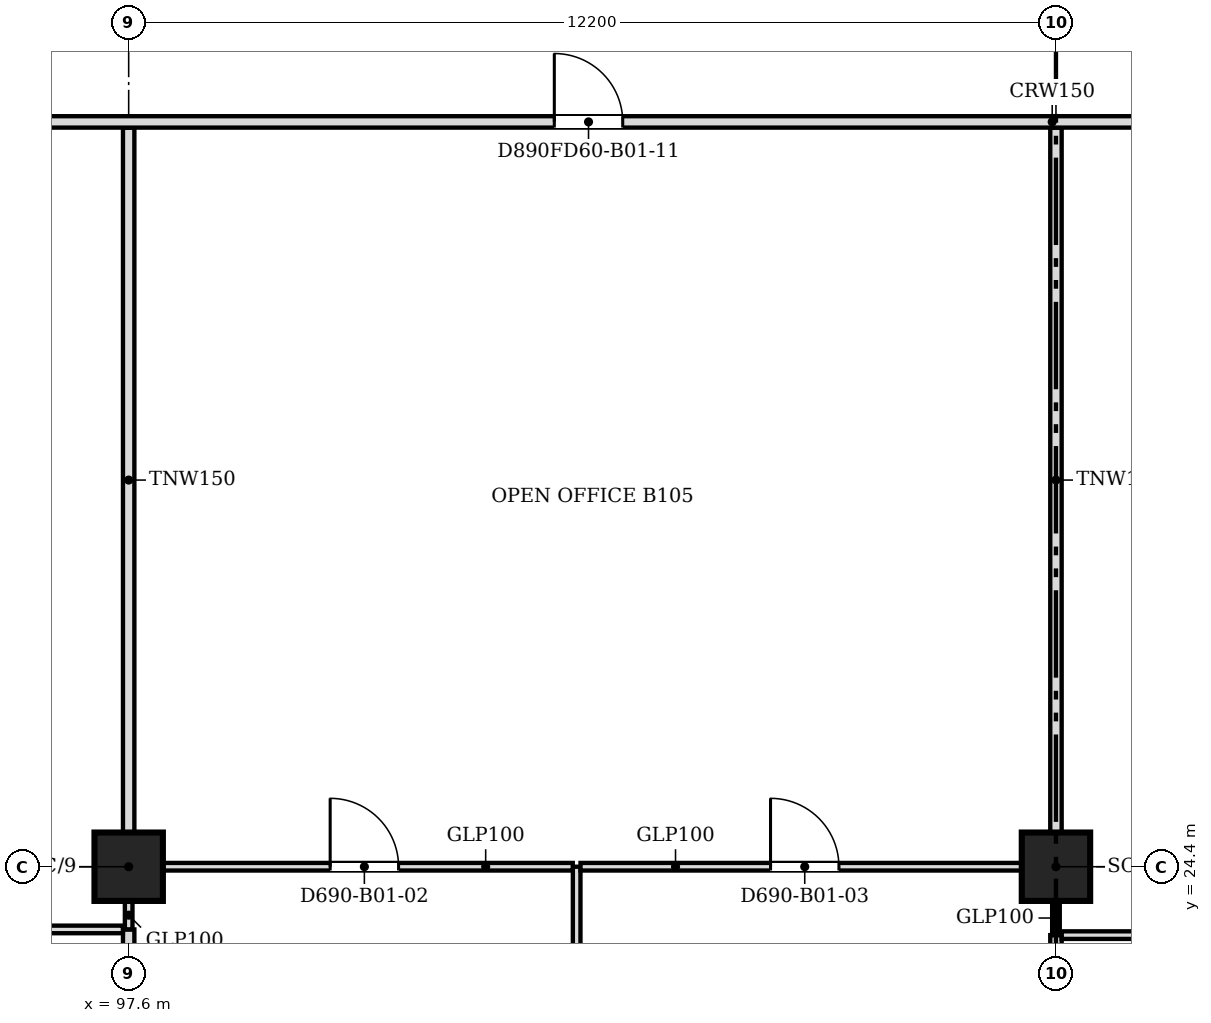
"""IFC4 building model, lengths in metres.
Left out: names, types, materials, properties, quantities, classifications, styles, units other than length and angle.
Written with IfcOpenShell. Run it as: python <this file> out.ifc"""

import sys

from ifc_helpers import new_model, si_unit, direction, frame, frame_2d, origin, origin_2d, place, context, subcontext, project, spatial, rectangle, extrude, source, transform, mapped, element, fill, save


model = new_model("IFC4")
c1 = context("Model", 3, precision=1e-05, world=origin(), true_north=direction((0.0, 1.0)))
c2 = subcontext(c1, "Body", "Model", "MODEL_VIEW")
j1 = project(units=[si_unit("LENGTHUNIT", "METRE"), si_unit("PLANEANGLEUNIT", "RADIAN")], contexts=[c1])
p1 = place(None, origin())
s1 = spatial("IfcSite", under=j1, at=p1, CompositionType="ELEMENT")
p2 = place(p1, origin())
s2 = spatial("IfcBuilding", under=s1, at=p2, CompositionType="ELEMENT")
p3 = place(p2, frame((0.0, 0.0, 16.8)))
s3 = spatial("IfcBuildingStorey", under=s2, at=p3, CompositionType="ELEMENT", Elevation=16.8)
for number, where, z_axis, x_axis in (
    (1, (97.6, 24.4, 0.0), (0.0, 0.0, 1.0), (1.0, 0.0, 0.0)),
    (2, (109.8, 24.4, 0.0), (0.0, 0.0, 1.0), (1.0, 0.0, 0.0)),
):
    element("IfcColumn", number, at=place(p3, frame(where, z_axis=z_axis, x_axis=x_axis)), inside=s3, PredefinedType="COLUMN", context=c2, shape_type="SweptSolid", body=[
        extrude(rectangle(XDim=0.9, YDim=0.9, at=origin_2d()), origin(), (0.0, 0.0, 1.0), 4.3),
    ])
p4 = place(p3, frame((97.6, 18.8, 0.0), z_axis=(0.0, 0.0, 1.0), x_axis=(0.0, 1.0, 0.0)))
e3 = element("IfcWall", 3, at=p4, inside=s3, PredefinedType="PARTITIONING", context=c2, shape_type="SweptSolid", body=[
    extrude(rectangle(XDim=4.775, YDim=0.15, at=frame_2d((2.387, 0.0))), origin(), (0.0, 0.0, 1.0), 3.415),
])
p5 = place(p3, frame((103.494, 18.8, 0.0), z_axis=(0.0, 0.0, 1.0), x_axis=(0.0, 1.0, 0.0)))
e4 = element("IfcWall", 4, at=p5, inside=s3, PredefinedType="PARTITIONING", context=c2, shape_type="SweptSolid", body=[
    extrude(rectangle(XDim=5.6, YDim=0.1, at=frame_2d((2.8, 0.0))), origin(), (0.0, 0.0, 1.0), 3.415),
])
p6 = place(p3, frame((109.8, 18.8, 0.0), z_axis=(0.0, 0.0, 1.0), x_axis=(0.0, 1.0, 0.0)))
e5 = element("IfcWall", 5, at=p6, inside=s3, PredefinedType="PARTITIONING", context=c2, shape_type="SweptSolid", body=[
    extrude(rectangle(XDim=4.7, YDim=0.15, at=frame_2d((2.35, 0.0))), origin(), (0.0, 0.0, 1.0), 3.415),
])
p7 = place(p3, frame((109.8, 23.501, 0.0), z_axis=(0.0, 0.0, 1.0), x_axis=(0.0, 1.0, 0.0)))
e6 = element("IfcWall", 6, at=p7, inside=s3, PredefinedType="PARTITIONING", context=c2, shape_type="SweptSolid", body=[
    extrude(rectangle(XDim=0.448, YDim=0.1, at=frame_2d((0.224, 0.0))), origin(), (0.0, 0.0, 1.0), 3.415),
])
p8 = place(p3, frame((121.924, 23.5, 0.0), z_axis=(0.0, 0.0, 1.0), x_axis=(-1.0, 0.0, 0.0)))
e7 = element("IfcWall", 7, at=p8, inside=s3, PredefinedType="PARTITIONING", context=c2, shape_type="SweptSolid", body=[
    extrude(rectangle(XDim=12.048, YDim=0.1, at=frame_2d((6.024, 0.0))), origin(), (0.0, 0.0, 1.0), 3.415),
])
m1 = source(origin(), c2, "Body", "SweptSolid", [
    extrude(rectangle(XDim=0.9, YDim=2.1, at=frame_2d((0.45, 1.05))), frame((0.0, 0.06, 0.0), z_axis=(0.0, -1.0, 0.0), x_axis=(1.0, 0.0, 0.0)), (0.0, 0.0, 1.0), 0.12),
])
p9 = place(p8, frame((8.648, 0.0, 0.0)))
e8 = element("IfcOpeningElement", 8, at=p9, cuts=e7, PredefinedType="OPENING", context=c2, shape_type="MappedRepresentation", body=[
    mapped(m1, transform((0.0, 0.0, 0.0), scale=1.0)),
])
p10 = place(p8, frame((2.63, 0.0, 0.0)))
e9 = element("IfcOpeningElement", 9, at=p10, cuts=e7, PredefinedType="OPENING", context=c2, shape_type="MappedRepresentation", body=[
    mapped(m1, transform((0.0, 0.0, 0.0), scale=1.0)),
])
p11 = place(p3, frame((97.524, 23.575, 0.0), z_axis=(0.0, 0.0, 1.0), x_axis=(-1.0, 0.0, 0.0)))
e10 = element("IfcWall", 10, at=p11, inside=s3, PredefinedType="PARTITIONING", context=c2, shape_type="SweptSolid", body=[
    extrude(rectangle(XDim=11.27, YDim=0.1, at=frame_2d((5.635, 0.0))), origin(), (0.0, 0.0, 1.0), 3.415),
])
p12 = place(p11, frame((8.17, 0.0, 0.0)))
e11 = element("IfcOpeningElement", 11, at=p12, cuts=e10, PredefinedType="OPENING", context=c2, shape_type="MappedRepresentation", body=[
    mapped(m1, transform((0.0, 0.0, 0.0), scale=1.0)),
])
p13 = place(p11, frame((2.572, 0.0, 0.0)))
e12 = element("IfcOpeningElement", 12, at=p13, cuts=e10, PredefinedType="OPENING", context=c2, shape_type="MappedRepresentation", body=[
    mapped(m1, transform((0.0, 0.0, 0.0), scale=1.0)),
])
p14 = place(p3, frame((97.6, 23.576, 0.0), z_axis=(0.0, 0.0, 1.0), x_axis=(0.0, 1.0, 0.0)))
e13 = element("IfcWall", 13, at=p14, inside=s3, PredefinedType="PARTITIONING", context=c2, shape_type="SweptSolid", body=[
    extrude(rectangle(XDim=0.373, YDim=0.1, at=frame_2d((0.187, 0.0))), origin(), (0.0, 0.0, 1.0), 3.415),
])
p15 = place(p3, frame((103.443, 24.4, 0.0), z_axis=(0.0, 0.0, 1.0), x_axis=(-1.0, 0.0, 0.0)))
e14 = element("IfcWall", 14, at=p15, inside=s3, PredefinedType="PARTITIONING", context=c2, shape_type="SweptSolid", body=[
    extrude(rectangle(XDim=5.392, YDim=0.1, at=frame_2d((2.696, 0.0))), origin(), (0.0, 0.0, 1.0), 3.415),
])
p16 = place(p15, frame((2.292, 0.0, 0.0)))
e15 = element("IfcOpeningElement", 15, at=p16, cuts=e14, PredefinedType="OPENING", context=c2, shape_type="MappedRepresentation", body=[
    mapped(m1, transform((0.0, 0.0, 0.0), scale=1.0)),
])
p17 = place(p3, frame((109.349, 24.4, 0.0), z_axis=(0.0, 0.0, 1.0), x_axis=(-1.0, 0.0, 0.0)))
e16 = element("IfcWall", 16, at=p17, inside=s3, PredefinedType="PARTITIONING", context=c2, shape_type="SweptSolid", body=[
    extrude(rectangle(XDim=5.804, YDim=0.1, at=frame_2d((2.902, 0.0))), origin(), (0.0, 0.0, 1.0), 3.415),
])
p18 = place(p17, frame((2.404, 0.0, 0.0)))
e17 = element("IfcOpeningElement", 17, at=p18, cuts=e16, PredefinedType="OPENING", context=c2, shape_type="MappedRepresentation", body=[
    mapped(m1, transform((0.0, 0.0, 0.0), scale=1.0)),
])
for number, where, z_axis, x_axis in (
    (18, (97.6, 24.851, 0.0), (0.0, 0.0, 1.0), (0.0, 1.0, 0.0)),
    (19, (109.8, 24.851, 0.0), (0.0, 0.0, 1.0), (0.0, 1.0, 0.0)),
):
    element("IfcWall", number, at=place(p3, frame(where, z_axis=z_axis, x_axis=x_axis)), inside=s3, PredefinedType="PARTITIONING", context=c2, shape_type="SweptSolid", body=[
        extrude(rectangle(XDim=9.273, YDim=0.15, at=frame_2d((4.636, 0.0))), origin(), (0.0, 0.0, 1.0), 3.415),
    ])
p19 = place(p3, frame((133.7, 34.2, 0.0), z_axis=(0.0, 0.0, 1.0), x_axis=(-1.0, 0.0, 0.0)))
e20 = element("IfcWall", 20, at=p19, inside=s3, PredefinedType="PARTITIONING", context=c2, shape_type="SweptSolid", body=[
    extrude(rectangle(XDim=47.8, YDim=0.15, at=frame_2d((23.9, 0.0))), origin(), (0.0, 0.0, 1.0), 3.415),
])
m2 = source(origin(), c2, "Body", "SweptSolid", [
    extrude(rectangle(XDim=0.9, YDim=2.1, at=frame_2d((0.45, 1.05))), frame((0.0, 0.085, 0.0), z_axis=(0.0, -1.0, 0.0), x_axis=(1.0, 0.0, 0.0)), (0.0, 0.0, 1.0), 0.17),
])
p20 = place(p19, frame((2.099, 0.0, 0.0)))
e21 = element("IfcOpeningElement", 21, at=p20, cuts=e20, PredefinedType="OPENING", context=c2, shape_type="MappedRepresentation", body=[
    mapped(m2, transform((0.0, 0.0, 0.0), scale=1.0)),
])
p21 = place(p19, frame((7.999, 0.0, 0.0)))
e22 = element("IfcOpeningElement", 22, at=p21, cuts=e20, PredefinedType="OPENING", context=c2, shape_type="MappedRepresentation", body=[
    mapped(m2, transform((0.0, 0.0, 0.0), scale=1.0)),
])
p22 = place(p19, frame((41.5, 0.0, 0.0)))
e23 = element("IfcOpeningElement", 23, at=p22, cuts=e20, PredefinedType="OPENING", context=c2, shape_type="MappedRepresentation", body=[
    mapped(m2, transform((0.0, 0.0, 0.0), scale=1.0)),
])
p23 = place(p19, frame((17.399, 0.0, 0.0)))
e24 = element("IfcOpeningElement", 24, at=p23, cuts=e20, PredefinedType="OPENING", context=c2, shape_type="MappedRepresentation", body=[
    mapped(m2, transform((0.0, 0.0, 0.0), scale=1.0)),
])
p24 = place(p19, frame((29.6, 0.0, 0.0)))
e25 = element("IfcOpeningElement", 25, at=p24, cuts=e20, PredefinedType="OPENING", context=c2, shape_type="MappedRepresentation", body=[
    mapped(m2, transform((0.0, 0.0, 0.0), scale=1.0)),
])
m3 = source(origin(), c2, "Body", "SweptSolid", [
    extrude(rectangle(XDim=0.9, YDim=2.1, at=frame_2d((0.45, 1.05))), frame((0.0, 0.025, 0.0), z_axis=(0.0, -1.0, 0.0), x_axis=(1.0, 0.0, 0.0)), (0.0, 0.0, 1.0), 0.05),
])
p25 = place(p16, origin())
e26 = element("IfcDoor", 26, at=p25, inside=s3, OperationType="SINGLE_SWING_RIGHT", PredefinedType="DOOR", context=c2, shape_type="MappedRepresentation", body=[
    mapped(m3, transform((0.0, 0.0, 0.0), scale=1.0)),
])
fill(e15, e26)
p26 = place(p18, origin())
e27 = element("IfcDoor", 27, at=p26, inside=s3, OperationType="SINGLE_SWING_RIGHT", PredefinedType="DOOR", context=c2, shape_type="MappedRepresentation", body=[
    mapped(m3, transform((0.0, 0.0, 0.0), scale=1.0)),
])
fill(e17, e27)
p27 = place(p24, origin())
e28 = element("IfcDoor", 28, at=p27, inside=s3, OperationType="SINGLE_SWING_RIGHT", PredefinedType="DOOR", context=c2, shape_type="MappedRepresentation", body=[
    mapped(m3, transform((0.0, 0.0, 0.0), scale=1.0)),
])
fill(e25, e28)
save(model, sys.argv[1])
